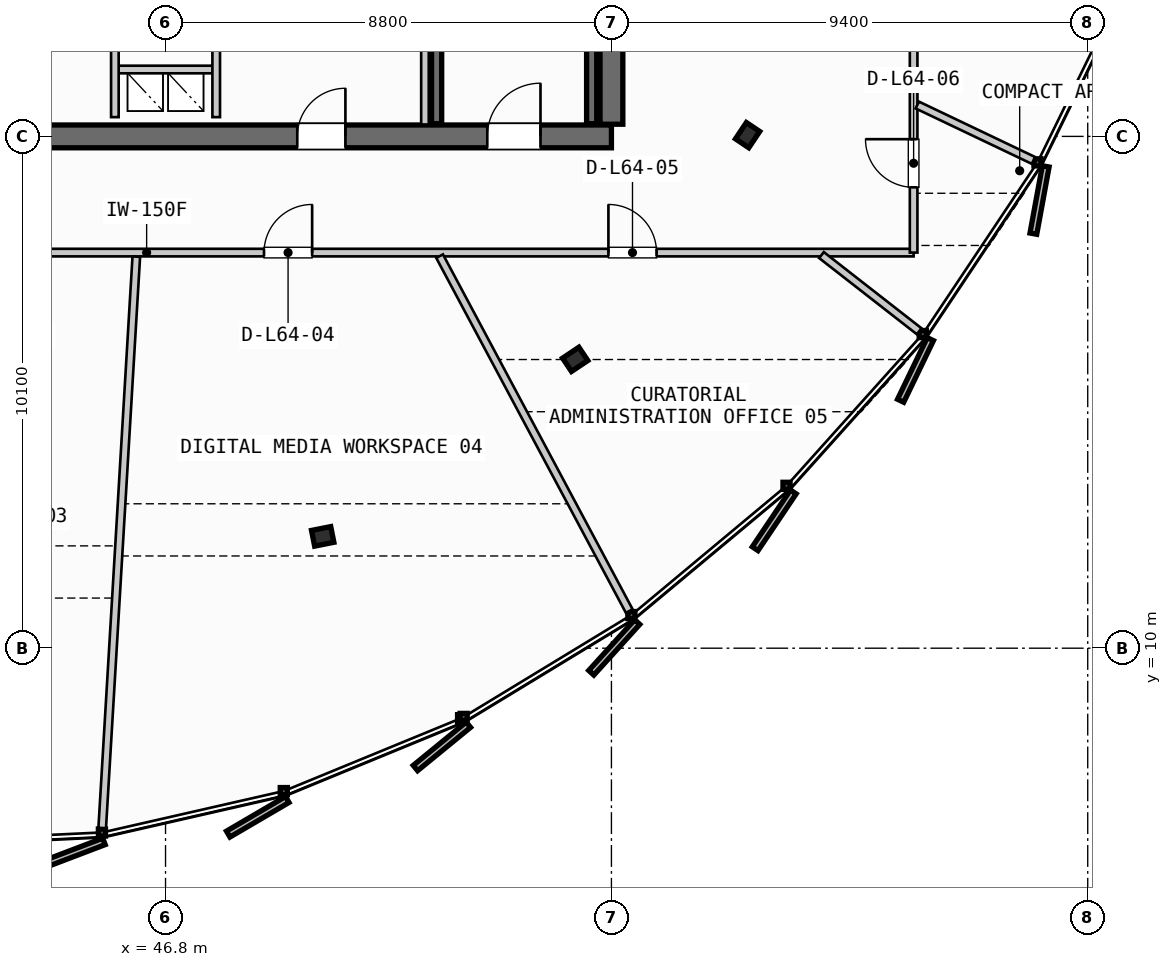
"""IFC4 building model, lengths in metres.
Left out: names, types, materials, properties, quantities, classifications, styles, units other than length and angle.
Written with IfcOpenShell. Run it as: python <this file> out.ifc"""

import sys

from ifc_helpers import new_model, si_unit, direction, frame, frame_2d, origin, origin_2d, place, context, subcontext, project, spatial, rectangle, i_section, extrude, source, transform, mapped, element, fill, save


model = new_model("IFC4")
c1 = context("Model", 3, precision=1e-05, world=origin(), true_north=direction((0.0, 1.0)))
c2 = subcontext(c1, "Body", "Model", "MODEL_VIEW")
j1 = project(units=[si_unit("LENGTHUNIT", "METRE"), si_unit("PLANEANGLEUNIT", "RADIAN")], contexts=[c1])
p1 = place(None, origin())
s1 = spatial("IfcSite", under=j1, at=p1, CompositionType="ELEMENT")
p2 = place(p1, origin())
s2 = spatial("IfcBuilding", under=s1, at=p2, CompositionType="ELEMENT")
p3 = place(p2, frame((0.0, 0.0, 245.65)))
s3 = spatial("IfcBuildingStorey", under=s2, at=p3, CompositionType="ELEMENT", Elevation=245.65)
p4 = place(p3, frame((38.0, 20.1, 0.0), z_axis=(0.0, 0.0, 1.0), x_axis=(1.0, 0.0, 0.0)))
e1 = element("IfcWall", 1, at=p4, inside=s3, PredefinedType="SHEAR", context=c2, shape_type="SweptSolid", body=[
    extrude(rectangle(XDim=17.6, YDim=0.45, at=frame_2d((8.8, 0.0))), origin(), (0.0, 0.0, 1.0), 3.21),
])
p5 = place(p4, frame((1.4, 0.0, 0.0)))
e2 = element("IfcOpeningElement", 2, at=p5, cuts=e1, PredefinedType="OPENING", context=c2, shape_type="SweptSolid", body=[
    extrude(rectangle(XDim=1.05, YDim=2.15, at=frame_2d((0.525, 1.075))), frame((0.0, 0.235, 0.0), z_axis=(0.0, -1.0, 0.0), x_axis=(1.0, 0.0, 0.0)), (0.0, 0.0, 1.0), 0.47),
])
p6 = place(p4, frame((15.15, 0.0, 0.0)))
e3 = element("IfcOpeningElement", 3, at=p6, cuts=e1, PredefinedType="OPENING", context=c2, shape_type="SweptSolid", body=[
    extrude(rectangle(XDim=1.05, YDim=2.15, at=frame_2d((0.525, 1.075))), frame((0.0, 0.235, 0.0), z_axis=(0.0, -1.0, 0.0), x_axis=(1.0, 0.0, 0.0)), (0.0, 0.0, 1.0), 0.47),
])
p7 = place(p4, frame((5.25, 0.0, 0.0)))
e4 = element("IfcOpeningElement", 4, at=p7, cuts=e1, PredefinedType="OPENING", context=c2, shape_type="SweptSolid", body=[
    extrude(rectangle(XDim=0.95, YDim=2.15, at=frame_2d((0.475, 1.075))), frame((0.0, 0.235, 0.0), z_axis=(0.0, -1.0, 0.0), x_axis=(1.0, 0.0, 0.0)), (0.0, 0.0, 1.0), 0.47),
])
p8 = place(p4, frame((11.4, 0.0, 0.0)))
e5 = element("IfcOpeningElement", 5, at=p8, cuts=e1, PredefinedType="OPENING", context=c2, shape_type="SweptSolid", body=[
    extrude(rectangle(XDim=0.95, YDim=2.15, at=frame_2d((0.475, 1.075))), frame((0.0, 0.235, 0.0), z_axis=(0.0, -1.0, 0.0), x_axis=(1.0, 0.0, 0.0)), (0.0, 0.0, 1.0), 0.47),
])
p9 = place(p3, frame((55.6, 20.34, 0.0), z_axis=(0.0, 0.0, 1.0), x_axis=(0.0, 1.0, 0.0)))
e6 = element("IfcWall", 6, at=p9, inside=s3, PredefinedType="SHEAR", context=c2, shape_type="SweptSolid", body=[
    extrude(rectangle(XDim=14.92, YDim=0.45, at=frame_2d((7.46, 0.0))), origin(), (0.0, 0.0, 1.0), 3.21),
])
p10 = place(p9, frame((12.71, 0.0, 0.0)))
e7 = element("IfcOpeningElement", 7, at=p10, cuts=e6, PredefinedType="OPENING", context=c2, shape_type="SweptSolid", body=[
    extrude(rectangle(XDim=1.05, YDim=2.15, at=frame_2d((0.525, 1.075))), frame((0.0, 0.235, 0.0), z_axis=(0.0, -1.0, 0.0), x_axis=(1.0, 0.0, 0.0)), (0.0, 0.0, 1.0), 0.47),
])
p11 = place(p9, frame((8.61, 0.0, 0.0)))
e8 = element("IfcOpeningElement", 8, at=p11, cuts=e6, PredefinedType="OPENING", context=c2, shape_type="SweptSolid", body=[
    extrude(rectangle(XDim=1.1, YDim=2.2, at=frame_2d((0.55, 1.1))), frame((0.0, 0.235, 0.0), z_axis=(0.0, -1.0, 0.0), x_axis=(1.0, 0.0, 0.0)), (0.0, 0.0, 1.0), 0.47),
])
m1 = source(origin(), c2, "Body", "SweptSolid", [
    extrude(i_section(OverallWidth=0.387, OverallDepth=0.316, WebThickness=0.019, FlangeThickness=0.028, FilletRadius=0.015, at=origin_2d()), origin(), (0.0, 0.0, 1.0), 3.21),
])
for number, where, z_axis, x_axis in (
    (9, (49.902, 12.207, 0.0), (0.0, 0.0, 1.0), (0.195, -0.981, 0.0)),
    (10, (54.885, 15.7, 0.0), (0.0, 0.0, 1.0), (0.556, -0.831, 0.0)),
    (11, (58.287, 20.125, 0.0), (0.0, 0.0, 1.0), (0.831, -0.556, 0.0)),
):
    element("IfcColumn", number, at=place(p3, frame(where, z_axis=z_axis, x_axis=x_axis)), inside=s3, PredefinedType="COLUMN", context=c2, shape_type="MappedRepresentation", body=[
        mapped(m1, transform((0.0, 0.0, 0.0), scale=1.0)),
    ])
for number, where, z_axis, x_axis in (
    (12, (55.21, 27.7, 0.0), (0.0, 0.0, 1.0), (0.0, -1.0, 0.0)),
    (13, (52.15, 20.35, 0.0), (0.0, 0.0, 1.0), (0.0, 1.0, 0.0)),
):
    element("IfcWall", number, at=place(p3, frame(where, z_axis=z_axis, x_axis=x_axis)), inside=s3, PredefinedType="SHEAR", context=c2, shape_type="SweptSolid", body=[
        extrude(rectangle(XDim=7.35, YDim=0.2, at=frame_2d((3.675, 0.0))), origin(), (0.0, 0.0, 1.0), 3.21),
    ])
p12 = place(p3, frame((45.8, 21.42, 0.0), z_axis=(0.0, 0.0, 1.0), x_axis=(1.0, 0.0, 0.0)))
e14 = element("IfcWall", 14, at=p12, inside=s3, PredefinedType="PARTITIONING", context=c2, shape_type="SweptSolid", body=[
    extrude(rectangle(XDim=2.0, YDim=0.15, at=frame_2d((1.0, 0.0))), origin(), (0.0, 0.0, 1.0), 2.28),
])
for number, where, z_axis, x_axis in (
    (15, (45.8, 20.48, 0.0), (0.0, 0.0, 1.0), (0.0, 1.0, 0.0)),
    (16, (47.8, 20.48, 0.0), (0.0, 0.0, 1.0), (0.0, 1.0, 0.0)),
):
    element("IfcWall", number, at=place(p3, frame(where, z_axis=z_axis, x_axis=x_axis)), inside=s3, PredefinedType="PARTITIONING", context=c2, shape_type="SweptSolid", body=[
        extrude(rectangle(XDim=2.24, YDim=0.15, at=frame_2d((1.12, 0.0))), origin(), (0.0, 0.0, 1.0), 2.28),
    ])
p13 = place(p3, frame((51.92, 20.335, 0.0), z_axis=(0.0, 0.0, 1.0), x_axis=(0.0, 1.0, 0.0)))
e17 = element("IfcWall", 17, at=p13, inside=s3, PredefinedType="PARTITIONING", context=c2, shape_type="SweptSolid", body=[
    extrude(rectangle(XDim=2.395, YDim=0.15, at=frame_2d((1.198, 0.0))), origin(), (0.0, 0.0, 1.0), 2.28),
])
p14 = place(p3, frame((31.29, 17.807, 0.0), z_axis=(0.0, 0.0, 1.0), x_axis=(1.0, 0.0, 0.0)))
e18 = element("IfcWall", 18, at=p14, inside=s3, PredefinedType="PARTITIONING", context=c2, shape_type="SweptSolid", body=[
    extrude(rectangle(XDim=30.274, YDim=0.15, at=frame_2d((15.137, 0.0))), origin(), (0.0, 0.0, 1.0), 2.28),
])
p15 = place(p14, frame((4.734, 0.0, 0.0)))
e19 = element("IfcOpeningElement", 19, at=p15, cuts=e18, PredefinedType="OPENING", context=c2, shape_type="SweptSolid", body=[
    extrude(rectangle(XDim=0.95, YDim=2.15, at=frame_2d((0.475, 1.075))), frame((0.0, 0.085, 0.0), z_axis=(0.0, -1.0, 0.0), x_axis=(1.0, 0.0, 0.0)), (0.0, 0.0, 1.0), 0.17),
])
p16 = place(p14, frame((11.892, 0.0, 0.0)))
e20 = element("IfcOpeningElement", 20, at=p16, cuts=e18, PredefinedType="OPENING", context=c2, shape_type="SweptSolid", body=[
    extrude(rectangle(XDim=0.95, YDim=2.15, at=frame_2d((0.475, 1.075))), frame((0.0, 0.085, 0.0), z_axis=(0.0, -1.0, 0.0), x_axis=(1.0, 0.0, 0.0)), (0.0, 0.0, 1.0), 0.17),
])
p17 = place(p14, frame((17.453, 0.0, 0.0)))
e21 = element("IfcOpeningElement", 21, at=p17, cuts=e18, PredefinedType="OPENING", context=c2, shape_type="SweptSolid", body=[
    extrude(rectangle(XDim=0.95, YDim=2.15, at=frame_2d((0.475, 1.075))), frame((0.0, 0.085, 0.0), z_axis=(0.0, -1.0, 0.0), x_axis=(1.0, 0.0, 0.0)), (0.0, 0.0, 1.0), 0.17),
])
p18 = place(p14, frame((24.251, 0.0, 0.0)))
e22 = element("IfcOpeningElement", 22, at=p18, cuts=e18, PredefinedType="OPENING", context=c2, shape_type="SweptSolid", body=[
    extrude(rectangle(XDim=0.95, YDim=2.15, at=frame_2d((0.475, 1.075))), frame((0.0, 0.085, 0.0), z_axis=(0.0, -1.0, 0.0), x_axis=(1.0, 0.0, 0.0)), (0.0, 0.0, 1.0), 0.17),
])
p19 = place(p3, frame((61.564, 17.807, 0.0), z_axis=(0.0, 0.0, 1.0), x_axis=(0.0, 1.0, 0.0)))
e23 = element("IfcWall", 23, at=p19, inside=s3, PredefinedType="PARTITIONING", context=c2, shape_type="SweptSolid", body=[
    extrude(rectangle(XDim=19.986, YDim=0.15, at=frame_2d((9.993, 0.0))), origin(), (0.0, 0.0, 1.0), 2.28),
])
p20 = place(p19, frame((1.288, 0.0, 0.0)))
e24 = element("IfcOpeningElement", 24, at=p20, cuts=e23, PredefinedType="OPENING", context=c2, shape_type="SweptSolid", body=[
    extrude(rectangle(XDim=0.95, YDim=2.15, at=frame_2d((0.475, 1.075))), frame((0.0, 0.085, 0.0), z_axis=(0.0, -1.0, 0.0), x_axis=(1.0, 0.0, 0.0)), (0.0, 0.0, 1.0), 0.17),
])
p21 = place(p19, frame((8.755, 0.0, 0.0)))
e25 = element("IfcOpeningElement", 25, at=p21, cuts=e23, PredefinedType="OPENING", context=c2, shape_type="SweptSolid", body=[
    extrude(rectangle(XDim=0.95, YDim=2.15, at=frame_2d((0.475, 1.075))), frame((0.0, 0.085, 0.0), z_axis=(0.0, -1.0, 0.0), x_axis=(1.0, 0.0, 0.0)), (0.0, 0.0, 1.0), 0.17),
])
p22 = place(p19, frame((16.991, 0.0, 0.0)))
e26 = element("IfcOpeningElement", 26, at=p22, cuts=e23, PredefinedType="OPENING", context=c2, shape_type="SweptSolid", body=[
    extrude(rectangle(XDim=0.95, YDim=2.15, at=frame_2d((0.475, 1.075))), frame((0.0, 0.085, 0.0), z_axis=(0.0, -1.0, 0.0), x_axis=(1.0, 0.0, 0.0)), (0.0, 0.0, 1.0), 0.17),
])
p23 = place(p3, frame((46.223, 17.727, 0.0), z_axis=(0.0, 0.0, 1.0), x_axis=(-0.059592486855, -0.998222788515, 0.0)))
e27 = element("IfcWall", 27, at=p23, inside=s3, PredefinedType="PARTITIONING", context=c2, shape_type="SweptSolid", body=[
    extrude(rectangle(XDim=11.295, YDim=0.15, at=frame_2d((5.647, 0.0))), origin(), (0.0, 0.0, 1.0), 2.28),
])
p24 = place(p3, frame((52.209, 17.736, 0.0), z_axis=(0.0, 0.0, 1.0), x_axis=(0.471301403893, -0.881972214239, 0.0)))
e28 = element("IfcWall", 28, at=p24, inside=s3, PredefinedType="PARTITIONING", context=c2, shape_type="SweptSolid", body=[
    extrude(rectangle(XDim=7.941, YDim=0.15, at=frame_2d((3.97, 0.0))), origin(), (0.0, 0.0, 1.0), 2.28),
])
p25 = place(p3, frame((59.746, 17.758, 0.0), z_axis=(0.0, 0.0, 1.0), x_axis=(0.788469366892, -0.61507402601, 0.0)))
e29 = element("IfcWall", 29, at=p25, inside=s3, PredefinedType="PARTITIONING", context=c2, shape_type="SweptSolid", body=[
    extrude(rectangle(XDim=2.444, YDim=0.15, at=frame_2d((1.222, 0.0))), origin(), (0.0, 0.0, 1.0), 2.28),
])
p26 = place(p3, frame((61.636, 20.719, 0.0), z_axis=(0.0, 0.0, 1.0), x_axis=(0.902636442074, -0.430403826006, 0.0)))
e30 = element("IfcWall", 30, at=p26, inside=s3, PredefinedType="PARTITIONING", context=c2, shape_type="SweptSolid", body=[
    extrude(rectangle(XDim=2.539, YDim=0.15, at=frame_2d((1.27, 0.0))), origin(), (0.0, 0.0, 1.0), 2.28),
])
m2 = source(origin(), c2, "Body", "SweptSolid", [
    extrude(rectangle(XDim=1.05, YDim=2.15, at=frame_2d((0.525, 1.075))), frame((0.0, 0.025, 0.0), z_axis=(0.0, -1.0, 0.0), x_axis=(1.0, 0.0, 0.0)), (0.0, 0.0, 1.0), 0.05),
])
p27 = place(p6, origin())
e31 = element("IfcDoor", 31, at=p27, inside=s3, OperationType="SINGLE_SWING_RIGHT", PredefinedType="DOOR", context=c2, shape_type="MappedRepresentation", body=[
    mapped(m2, transform((0.0, 0.0, 0.0), scale=1.0)),
])
fill(e3, e31)
m3 = source(origin(), c2, "Body", "SweptSolid", [
    extrude(rectangle(XDim=0.95, YDim=2.15, at=frame_2d((0.475, 1.075))), frame((0.0, 0.025, 0.0), z_axis=(0.0, -1.0, 0.0), x_axis=(1.0, 0.0, 0.0)), (0.0, 0.0, 1.0), 0.05),
])
p28 = place(p8, origin())
e32 = element("IfcDoor", 32, at=p28, inside=s3, OperationType="SINGLE_SWING_RIGHT", PredefinedType="DOOR", context=c2, shape_type="MappedRepresentation", body=[
    mapped(m3, transform((0.0, 0.0, 0.0), scale=1.0)),
])
fill(e5, e32)
p29 = place(p17, origin())
e33 = element("IfcDoor", 33, at=p29, inside=s3, OperationType="SINGLE_SWING_RIGHT", PredefinedType="DOOR", context=c2, shape_type="MappedRepresentation", body=[
    mapped(m3, transform((0.0, 0.0, 0.0), scale=1.0)),
])
fill(e21, e33)
p30 = place(p18, origin())
e34 = element("IfcDoor", 34, at=p30, inside=s3, OperationType="SINGLE_SWING_LEFT", PredefinedType="DOOR", context=c2, shape_type="MappedRepresentation", body=[
    mapped(m3, transform((0.0, 0.0, 0.0), scale=1.0)),
])
fill(e22, e34)
p31 = place(p20, origin())
e35 = element("IfcDoor", 35, at=p31, inside=s3, OperationType="SINGLE_SWING_RIGHT", PredefinedType="DOOR", context=c2, shape_type="MappedRepresentation", body=[
    mapped(m3, transform((0.0, 0.0, 0.0), scale=1.0)),
])
fill(e24, e35)
save(model, sys.argv[1])
